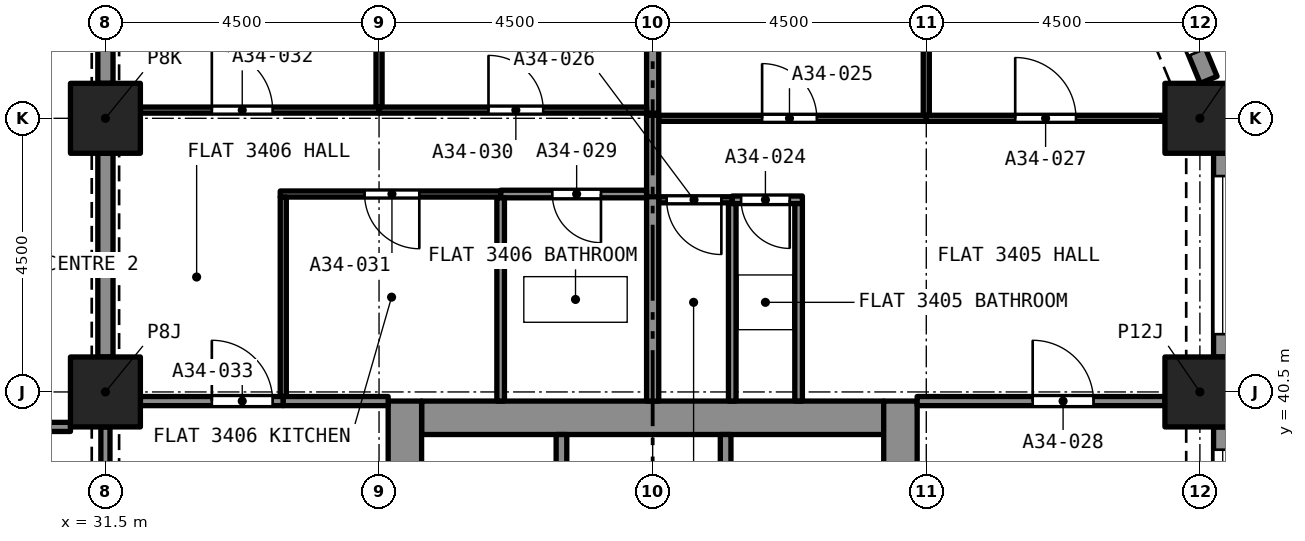
"""IFC4 building model, lengths in metres.
Left out: names, types, materials, properties, quantities, classifications, styles, units other than length and angle.
Written with IfcOpenShell. Run it as: python <this file> out.ifc"""

import sys

from ifc_helpers import new_model, si_unit, direction, frame, frame_2d, origin, origin_2d, place, context, subcontext, project, spatial, rectangle, extrude, element, fill, save


model = new_model("IFC4")
c1 = context("Model", 3, precision=1e-05, world=origin(), true_north=direction((0.0, 1.0)))
c2 = subcontext(c1, "Body", "Model", "MODEL_VIEW")
j1 = project(units=[si_unit("LENGTHUNIT", "METRE"), si_unit("PLANEANGLEUNIT", "RADIAN")], contexts=[c1])
p1 = place(None, origin())
s1 = spatial("IfcSite", under=j1, at=p1, CompositionType="ELEMENT")
p2 = place(p1, origin())
s2 = spatial("IfcBuilding", under=s1, at=p2, CompositionType="ELEMENT")
p3 = place(p2, frame((0.0, 0.0, 121.6)))
s3 = spatial("IfcBuildingStorey", under=s2, at=p3, CompositionType="ELEMENT", Elevation=121.6)
for number, where, z_axis, x_axis in (
    (1, (31.5, 40.5, 0.0), (0.0, 0.0, 1.0), (1.0, 0.0, 0.0)),
    (2, (49.5, 40.5, 0.0), (0.0, 0.0, 1.0), (1.0, 0.0, 0.0)),
    (3, (31.5, 45.0, 0.0), (0.0, 0.0, 1.0), (1.0, 0.0, 0.0)),
    (4, (49.5, 45.0, 0.0), (0.0, 0.0, 1.0), (1.0, 0.0, 0.0)),
):
    element("IfcColumn", number, at=place(p3, frame(where, z_axis=z_axis, x_axis=x_axis)), inside=s3, PredefinedType="COLUMN", context=c2, shape_type="SweptSolid", body=[
        extrude(rectangle(XDim=1.15, YDim=1.15, at=origin_2d()), origin(), (0.0, 0.0, 1.0), 3.2),
    ])
p4 = place(p3, frame((36.7, 40.075, 0.0), z_axis=(0.0, 0.0, 1.0), x_axis=(1.0, 0.0, 0.0)))
e5 = element("IfcWall", 5, at=p4, inside=s3, PredefinedType="SOLIDWALL", context=c2, shape_type="SweptSolid", body=[
    extrude(rectangle(XDim=7.6, YDim=0.55, at=frame_2d((3.8, 0.0))), origin(), (0.0, 0.0, 1.0), 3.2),
])
p5 = place(p3, frame((36.425, 27.15, 0.0), z_axis=(0.0, 0.0, 1.0), x_axis=(0.0, 1.0, 0.0)))
e6 = element("IfcWall", 6, at=p5, inside=s3, PredefinedType="SOLIDWALL", context=c2, shape_type="SweptSolid", body=[
    extrude(rectangle(XDim=13.2, YDim=0.55, at=frame_2d((6.6, 0.0))), origin(), (0.0, 0.0, 1.0), 3.2),
])
p6 = place(p5, frame((8.8, 0.0, 0.0)))
e7 = element("IfcOpeningElement", 7, at=p6, cuts=e6, PredefinedType="OPENING", context=c2, shape_type="SweptSolid", body=[
    extrude(rectangle(XDim=1.2, YDim=2.1, at=frame_2d((0.6, 1.05))), frame((0.0, 0.285, 0.0), z_axis=(0.0, -1.0, 0.0), x_axis=(1.0, 0.0, 0.0)), (0.0, 0.0, 1.0), 0.57),
])
p7 = place(p3, frame((44.575, 27.15, 0.0), z_axis=(0.0, 0.0, 1.0), x_axis=(0.0, 1.0, 0.0)))
e8 = element("IfcWall", 8, at=p7, inside=s3, PredefinedType="SOLIDWALL", context=c2, shape_type="SweptSolid", body=[
    extrude(rectangle(XDim=13.2, YDim=0.55, at=frame_2d((6.6, 0.0))), origin(), (0.0, 0.0, 1.0), 3.2),
])
p8 = place(p7, frame((8.8, 0.0, 0.0)))
e9 = element("IfcOpeningElement", 9, at=p8, cuts=e8, PredefinedType="OPENING", context=c2, shape_type="SweptSolid", body=[
    extrude(rectangle(XDim=1.2, YDim=2.1, at=frame_2d((0.6, 1.05))), frame((0.0, 0.285, 0.0), z_axis=(0.0, -1.0, 0.0), x_axis=(1.0, 0.0, 0.0)), (0.0, 0.0, 1.0), 0.57),
])
p9 = place(p3, frame((49.875, 39.925, 0.0), z_axis=(0.0, 0.0, 1.0), x_axis=(0.0, -1.0, 0.0)))
e10 = element("IfcWall", 10, at=p9, inside=s3, PredefinedType="SOLIDWALL", context=c2, shape_type="SweptSolid", body=[
    extrude(rectangle(XDim=3.35, YDim=0.3, at=frame_2d((1.675, 0.0))), origin(), (0.0, 0.0, 1.0), 3.2),
])
p10 = place(p9, frame((0.375, 0.0, 0.45)))
e11 = element("IfcOpeningElement", 11, at=p10, cuts=e10, PredefinedType="OPENING", context=c2, shape_type="SweptSolid", body=[
    extrude(rectangle(XDim=2.6, YDim=1.95, at=frame_2d((1.3, 0.975))), frame((0.0, 0.16, 0.0), z_axis=(0.0, -1.0, 0.0), x_axis=(1.0, 0.0, 0.0)), (0.0, 0.0, 1.0), 0.32),
])
p11 = place(p3, frame((49.875, 44.425, 0.0), z_axis=(0.0, 0.0, 1.0), x_axis=(0.0, -1.0, 0.0)))
e12 = element("IfcWall", 12, at=p11, inside=s3, PredefinedType="SOLIDWALL", context=c2, shape_type="SweptSolid", body=[
    extrude(rectangle(XDim=3.35, YDim=0.3, at=frame_2d((1.675, 0.0))), origin(), (0.0, 0.0, 1.0), 3.2),
])
p12 = place(p11, frame((0.375, 0.0, 0.45)))
e13 = element("IfcOpeningElement", 13, at=p12, cuts=e12, PredefinedType="OPENING", context=c2, shape_type="SweptSolid", body=[
    extrude(rectangle(XDim=2.6, YDim=1.95, at=frame_2d((1.3, 0.975))), frame((0.0, 0.16, 0.0), z_axis=(0.0, -1.0, 0.0), x_axis=(1.0, 0.0, 0.0)), (0.0, 0.0, 1.0), 0.32),
])
p13 = place(p3, frame((48.816, 47.631, 0.0), z_axis=(0.0, 0.0, 1.0), x_axis=(0.382723818695, -0.923862802911, 0.0)))
e14 = element("IfcWall", 14, at=p13, inside=s3, PredefinedType="SOLIDWALL", context=c2, shape_type="SweptSolid", body=[
    extrude(rectangle(XDim=2.164, YDim=0.3, at=frame_2d((1.082, 0.0))), origin(), (0.0, 0.0, 1.0), 3.2),
])
p14 = place(p13, frame((0.271, 0.0, 0.45)))
e15 = element("IfcOpeningElement", 15, at=p14, cuts=e14, PredefinedType="OPENING", context=c2, shape_type="SweptSolid", body=[
    extrude(rectangle(XDim=1.4, YDim=1.95, at=frame_2d((0.7, 0.975))), frame((0.0, 0.16, 0.0), z_axis=(0.0, -1.0, 0.0), x_axis=(1.0, 0.0, 0.0)), (0.0, 0.0, 1.0), 0.32),
])
p15 = place(p3, frame((42.962, 43.66, 0.0), z_axis=(0.0, 0.0, 1.0), x_axis=(-1.0, 0.0, 0.0)))
e16 = element("IfcWall", 16, at=p15, inside=s3, PredefinedType="PARTITIONING", context=c2, shape_type="SweptSolid", body=[
    extrude(rectangle(XDim=1.153, YDim=0.125, at=frame_2d((0.577, 0.0))), origin(), (0.0, 0.0, 1.0), 2.85),
])
p16 = place(p15, frame((0.208, 0.0, 0.0)))
e17 = element("IfcOpeningElement", 17, at=p16, cuts=e16, PredefinedType="OPENING", context=c2, shape_type="SweptSolid", body=[
    extrude(rectangle(XDim=0.8, YDim=2.1, at=frame_2d((0.4, 1.05))), frame((0.0, 0.073, 0.0), z_axis=(0.0, -1.0, 0.0), x_axis=(1.0, 0.0, 0.0)), (0.0, 0.0, 1.0), 0.145),
])
for number, where, z_axis, x_axis in (
    (18, (42.9, 40.35, 0.0), (0.0, 0.0, 1.0), (0.0, 1.0, 0.0)),
    (19, (41.809, 40.35, 0.0), (0.0, 0.0, 1.0), (0.0, 1.0, 0.0)),
):
    element("IfcWall", number, at=place(p3, frame(where, z_axis=z_axis, x_axis=x_axis)), inside=s3, PredefinedType="PARTITIONING", context=c2, shape_type="SweptSolid", body=[
        extrude(rectangle(XDim=3.247, YDim=0.125, at=frame_2d((1.624, 0.0))), origin(), (0.0, 0.0, 1.0), 2.85),
    ])
p17 = place(p3, frame((40.6, 45.0, 0.0), z_axis=(0.0, 0.0, 1.0), x_axis=(1.0, 0.0, 0.0)))
e20 = element("IfcWall", 20, at=p17, inside=s3, PredefinedType="PARTITIONING", context=c2, shape_type="SweptSolid", body=[
    extrude(rectangle(XDim=4.4, YDim=0.1, at=frame_2d((2.2, 0.0))), origin(), (0.0, 0.0, 1.0), 2.85),
])
p18 = place(p17, frame((1.7, 0.0, 0.0)))
e21 = element("IfcOpeningElement", 21, at=p18, cuts=e20, PredefinedType="OPENING", context=c2, shape_type="SweptSolid", body=[
    extrude(rectangle(XDim=0.9, YDim=2.1, at=frame_2d((0.45, 1.05))), frame((0.0, 0.06, 0.0), z_axis=(0.0, -1.0, 0.0), x_axis=(1.0, 0.0, 0.0)), (0.0, 0.0, 1.0), 0.12),
])
p19 = place(p3, frame((45.0, 45.05, 0.0), z_axis=(0.0, 0.0, 1.0), x_axis=(0.0, 1.0, 0.0)))
e22 = element("IfcWall", 22, at=p19, inside=s3, PredefinedType="PARTITIONING", context=c2, shape_type="SweptSolid", body=[
    extrude(rectangle(XDim=3.828, YDim=0.1, at=frame_2d((1.914, 0.0))), origin(), (0.0, 0.0, 1.0), 2.85),
])
p20 = place(p3, frame((40.5, 45.085, 0.0), z_axis=(0.0, 0.0, 1.0), x_axis=(0.0, 1.0, 0.0)))
e23 = element("IfcWall", 23, at=p20, inside=s3, PredefinedType="PARTITIONING", context=c2, shape_type="SweptSolid", body=[
    extrude(rectangle(XDim=3.84, YDim=0.2, at=frame_2d((1.92, 0.0))), origin(), (0.0, 0.0, 1.0), 2.85),
])
p21 = place(p3, frame((41.809, 43.66, 0.0), z_axis=(0.0, 0.0, 1.0), x_axis=(-1.0, 0.0, 0.0)))
e24 = element("IfcWall", 24, at=p21, inside=s3, PredefinedType="PARTITIONING", context=c2, shape_type="SweptSolid", body=[
    extrude(rectangle(XDim=1.209, YDim=0.1, at=frame_2d((0.604, 0.0))), origin(), (0.0, 0.0, 1.0), 2.85),
])
p22 = place(p21, frame((0.179, 0.0, 0.0)))
e25 = element("IfcOpeningElement", 25, at=p22, cuts=e24, PredefinedType="OPENING", context=c2, shape_type="SweptSolid", body=[
    extrude(rectangle(XDim=0.9, YDim=2.1, at=frame_2d((0.45, 1.05))), frame((0.0, 0.06, 0.0), z_axis=(0.0, -1.0, 0.0), x_axis=(1.0, 0.0, 0.0)), (0.0, 0.0, 1.0), 0.12),
])
p23 = place(p3, frame((45.0, 45.0, 0.0), z_axis=(0.0, 0.0, 1.0), x_axis=(1.0, 0.0, 0.0)))
e26 = element("IfcWall", 26, at=p23, inside=s3, PredefinedType="PARTITIONING", context=c2, shape_type="SweptSolid", body=[
    extrude(rectangle(XDim=3.878, YDim=0.1, at=frame_2d((1.939, 0.0))), origin(), (0.0, 0.0, 1.0), 2.85),
])
p24 = place(p23, frame((1.462, 0.0, 0.0)))
e27 = element("IfcOpeningElement", 27, at=p24, cuts=e26, PredefinedType="OPENING", context=c2, shape_type="SweptSolid", body=[
    extrude(rectangle(XDim=1.0, YDim=2.1, at=frame_2d((0.5, 1.05))), frame((0.0, 0.06, 0.0), z_axis=(0.0, -1.0, 0.0), x_axis=(1.0, 0.0, 0.0)), (0.0, 0.0, 1.0), 0.12),
])
p25 = place(p3, frame((40.5, 43.692, 0.0), z_axis=(0.0, 0.0, 1.0), x_axis=(0.0, 1.0, 0.0)))
e28 = element("IfcWall", 28, at=p25, inside=s3, PredefinedType="PARTITIONING", context=c2, shape_type="SweptSolid", body=[
    extrude(rectangle(XDim=1.358, YDim=0.2, at=frame_2d((0.679, 0.0))), origin(), (0.0, 0.0, 1.0), 2.85),
])
p26 = place(p3, frame((44.85, 40.35, 0.0), z_axis=(0.0, 0.0, 1.0), x_axis=(1.0, 0.0, 0.0)))
e29 = element("IfcWall", 29, at=p26, inside=s3, PredefinedType="PARTITIONING", context=c2, shape_type="SweptSolid", body=[
    extrude(rectangle(XDim=4.075, YDim=0.15, at=frame_2d((2.038, 0.0))), origin(), (0.0, 0.0, 1.0), 2.85),
])
p27 = place(p26, frame((1.9, 0.0, 0.0)))
e30 = element("IfcOpeningElement", 30, at=p27, cuts=e29, PredefinedType="OPENING", context=c2, shape_type="SweptSolid", body=[
    extrude(rectangle(XDim=1.0, YDim=2.1, at=frame_2d((0.5, 1.05))), frame((0.0, 0.085, 0.0), z_axis=(0.0, -1.0, 0.0), x_axis=(1.0, 0.0, 0.0)), (0.0, 0.0, 1.0), 0.17),
])
p28 = place(p3, frame((40.5, 40.35, 0.0), z_axis=(0.0, 0.0, 1.0), x_axis=(0.0, 1.0, 0.0)))
e31 = element("IfcWall", 31, at=p28, inside=s3, PredefinedType="PARTITIONING", context=c2, shape_type="SweptSolid", body=[
    extrude(rectangle(XDim=3.36, YDim=0.2, at=frame_2d((1.68, 0.0))), origin(), (0.0, 0.0, 1.0), 2.85),
])
p29 = place(p3, frame((40.4, 43.755, 0.0), z_axis=(0.0, 0.0, 1.0), x_axis=(-1.0, 0.0, 0.0)))
e32 = element("IfcWall", 32, at=p29, inside=s3, PredefinedType="PARTITIONING", context=c2, shape_type="SweptSolid", body=[
    extrude(rectangle(XDim=2.4, YDim=0.125, at=frame_2d((1.2, 0.0))), origin(), (0.0, 0.0, 1.0), 2.85),
])
p30 = place(p29, frame((0.75, 0.0, 0.0)))
e33 = element("IfcOpeningElement", 33, at=p30, cuts=e32, PredefinedType="OPENING", context=c2, shape_type="SweptSolid", body=[
    extrude(rectangle(XDim=0.8, YDim=2.1, at=frame_2d((0.4, 1.05))), frame((0.0, 0.073, 0.0), z_axis=(0.0, -1.0, 0.0), x_axis=(1.0, 0.0, 0.0)), (0.0, 0.0, 1.0), 0.145),
])
p31 = place(p3, frame((38.0, 40.35, 0.0), z_axis=(0.0, 0.0, 1.0), x_axis=(0.0, 1.0, 0.0)))
e34 = element("IfcWall", 34, at=p31, inside=s3, PredefinedType="PARTITIONING", context=c2, shape_type="SweptSolid", body=[
    extrude(rectangle(XDim=3.342, YDim=0.125, at=frame_2d((1.671, 0.0))), origin(), (0.0, 0.0, 1.0), 2.85),
])
p32 = place(p3, frame((36.0, 45.135, 0.0), z_axis=(0.0, 0.0, 1.0), x_axis=(1.0, 0.0, 0.0)))
e35 = element("IfcWall", 35, at=p32, inside=s3, PredefinedType="PARTITIONING", context=c2, shape_type="SweptSolid", body=[
    extrude(rectangle(XDim=4.4, YDim=0.1, at=frame_2d((2.2, 0.0))), origin(), (0.0, 0.0, 1.0), 2.85),
])
p33 = place(p32, frame((1.8, 0.0, 0.0)))
e36 = element("IfcOpeningElement", 36, at=p33, cuts=e35, PredefinedType="OPENING", context=c2, shape_type="SweptSolid", body=[
    extrude(rectangle(XDim=0.9, YDim=2.1, at=frame_2d((0.45, 1.05))), frame((0.0, 0.06, 0.0), z_axis=(0.0, -1.0, 0.0), x_axis=(1.0, 0.0, 0.0)), (0.0, 0.0, 1.0), 0.12),
])
p34 = place(p3, frame((36.0, 45.185, 0.0), z_axis=(0.0, 0.0, 1.0), x_axis=(0.0, 1.0, 0.0)))
e37 = element("IfcWall", 37, at=p34, inside=s3, PredefinedType="PARTITIONING", context=c2, shape_type="SweptSolid", body=[
    extrude(rectangle(XDim=3.74, YDim=0.1, at=frame_2d((1.87, 0.0))), origin(), (0.0, 0.0, 1.0), 2.85),
])
p35 = place(p3, frame((38.0, 43.755, 0.0), z_axis=(0.0, 0.0, 1.0), x_axis=(-1.0, 0.0, 0.0)))
e38 = element("IfcWall", 38, at=p35, inside=s3, PredefinedType="PARTITIONING", context=c2, shape_type="SweptSolid", body=[
    extrude(rectangle(XDim=3.625, YDim=0.1, at=frame_2d((1.812, 0.0))), origin(), (0.0, 0.0, 1.0), 2.85),
])
p36 = place(p35, frame((1.337, 0.0, 0.0)))
e39 = element("IfcOpeningElement", 39, at=p36, cuts=e38, PredefinedType="OPENING", context=c2, shape_type="SweptSolid", body=[
    extrude(rectangle(XDim=0.9, YDim=2.1, at=frame_2d((0.45, 1.05))), frame((0.0, 0.06, 0.0), z_axis=(0.0, -1.0, 0.0), x_axis=(1.0, 0.0, 0.0)), (0.0, 0.0, 1.0), 0.12),
])
p37 = place(p3, frame((34.425, 40.425, 0.0), z_axis=(0.0, 0.0, 1.0), x_axis=(0.0, 1.0, 0.0)))
e40 = element("IfcWall", 40, at=p37, inside=s3, PredefinedType="PARTITIONING", context=c2, shape_type="SweptSolid", body=[
    extrude(rectangle(XDim=3.28, YDim=0.1, at=frame_2d((1.64, 0.0))), origin(), (0.0, 0.0, 1.0), 2.85),
])
p38 = place(p3, frame((32.075, 45.135, 0.0), z_axis=(0.0, 0.0, 1.0), x_axis=(1.0, 0.0, 0.0)))
e41 = element("IfcWall", 41, at=p38, inside=s3, PredefinedType="PARTITIONING", context=c2, shape_type="SweptSolid", body=[
    extrude(rectangle(XDim=3.925, YDim=0.1, at=frame_2d((1.962, 0.0))), origin(), (0.0, 0.0, 1.0), 2.85),
])
p39 = place(p38, frame((1.175, 0.0, 0.0)))
e42 = element("IfcOpeningElement", 42, at=p39, cuts=e41, PredefinedType="OPENING", context=c2, shape_type="SweptSolid", body=[
    extrude(rectangle(XDim=1.0, YDim=2.1, at=frame_2d((0.5, 1.05))), frame((0.0, 0.06, 0.0), z_axis=(0.0, -1.0, 0.0), x_axis=(1.0, 0.0, 0.0)), (0.0, 0.0, 1.0), 0.12),
])
p40 = place(p3, frame((31.5, 41.075, 0.0), z_axis=(0.0, 0.0, 1.0), x_axis=(0.0, 1.0, 0.0)))
e43 = element("IfcWall", 43, at=p40, inside=s3, PredefinedType="PARTITIONING", context=c2, shape_type="SweptSolid", body=[
    extrude(rectangle(XDim=3.35, YDim=0.25, at=frame_2d((1.675, 0.0))), origin(), (0.0, 0.0, 1.0), 2.38),
])
p41 = place(p3, frame((32.075, 40.35, 0.0), z_axis=(0.0, 0.0, 1.0), x_axis=(1.0, 0.0, 0.0)))
e44 = element("IfcWall", 44, at=p41, inside=s3, PredefinedType="PARTITIONING", context=c2, shape_type="SweptSolid", body=[
    extrude(rectangle(XDim=2.35, YDim=0.15, at=frame_2d((1.175, 0.0))), origin(), (0.0, 0.0, 1.0), 2.85),
])
p42 = place(p41, frame((1.175, 0.0, 0.0)))
e45 = element("IfcOpeningElement", 45, at=p42, cuts=e44, PredefinedType="OPENING", context=c2, shape_type="SweptSolid", body=[
    extrude(rectangle(XDim=1.0, YDim=2.1, at=frame_2d((0.5, 1.05))), frame((0.0, 0.085, 0.0), z_axis=(0.0, -1.0, 0.0), x_axis=(1.0, 0.0, 0.0)), (0.0, 0.0, 1.0), 0.17),
])
p43 = place(p3, frame((34.425, 40.35, 0.0), z_axis=(0.0, 0.0, 1.0), x_axis=(1.0, 0.0, 0.0)))
e46 = element("IfcWall", 46, at=p43, inside=s3, PredefinedType="PARTITIONING", context=c2, shape_type="SweptSolid", body=[
    extrude(rectangle(XDim=1.725, YDim=0.15, at=frame_2d((0.862, 0.0))), origin(), (0.0, 0.0, 1.0), 2.85),
])
p44 = place(p3, frame((31.5, 45.575, 0.0), z_axis=(0.0, 0.0, 1.0), x_axis=(0.0, 1.0, 0.0)))
e47 = element("IfcWall", 47, at=p44, inside=s3, PredefinedType="PARTITIONING", context=c2, shape_type="SweptSolid", body=[
    extrude(rectangle(XDim=3.35, YDim=0.25, at=frame_2d((1.675, 0.0))), origin(), (0.0, 0.0, 1.0), 2.38),
])
p45 = place(p3, frame((27.0, 39.925, 0.0), z_axis=(0.0, 0.0, 1.0), x_axis=(1.0, 0.0, 0.0)))
e48 = element("IfcWall", 48, at=p45, inside=s3, PredefinedType="PARTITIONING", context=c2, shape_type="SweptSolid", body=[
    extrude(rectangle(XDim=3.925, YDim=0.15, at=frame_2d((1.962, 0.0))), origin(), (0.0, 0.0, 1.0), 2.75),
])
p46 = place(p45, frame((1.75, 0.0, 0.0)))
e49 = element("IfcOpeningElement", 49, at=p46, cuts=e48, PredefinedType="OPENING", context=c2, shape_type="SweptSolid", body=[
    extrude(rectangle(XDim=1.0, YDim=2.1, at=frame_2d((0.5, 1.05))), frame((0.0, 0.085, 0.0), z_axis=(0.0, -1.0, 0.0), x_axis=(1.0, 0.0, 0.0)), (0.0, 0.0, 1.0), 0.17),
])
p47 = place(p3, frame((31.5, 36.575, 0.0), z_axis=(0.0, 0.0, 1.0), x_axis=(0.0, 1.0, 0.0)))
e50 = element("IfcWall", 50, at=p47, inside=s3, PredefinedType="PARTITIONING", context=c2, shape_type="SweptSolid", body=[
    extrude(rectangle(XDim=3.35, YDim=0.15, at=frame_2d((1.675, 0.0))), origin(), (0.0, 0.0, 1.0), 2.38),
])
p48 = place(p47, frame((1.075, 0.0, 0.0)))
e51 = element("IfcOpeningElement", 51, at=p48, cuts=e50, PredefinedType="OPENING", context=c2, shape_type="SweptSolid", body=[
    extrude(rectangle(XDim=1.2, YDim=2.1, at=frame_2d((0.6, 1.05))), frame((0.0, 0.085, 0.0), z_axis=(0.0, -1.0, 0.0), x_axis=(1.0, 0.0, 0.0)), (0.0, 0.0, 1.0), 0.17),
])
for number, where, z_axis, x_axis in (
    (52, (41.7, 37.5, 0.0), (0.0, 0.0, 1.0), (0.0, 1.0, 0.0)),
    (53, (39.0, 37.5, 0.0), (0.0, 0.0, 1.0), (0.0, 1.0, 0.0)),
):
    element("IfcWall", number, at=place(p3, frame(where, z_axis=z_axis, x_axis=x_axis)), inside=s3, PredefinedType="SOLIDWALL", context=c2, shape_type="SweptSolid", body=[
        extrude(rectangle(XDim=2.3, YDim=0.175, at=frame_2d((1.15, 0.0))), origin(), (0.0, 0.0, 1.0), 2.85),
    ])
p49 = place(p10, origin())
e54 = element("IfcWindow", 54, at=p49, inside=s3, PartitioningType="SINGLE_PANEL", PredefinedType="WINDOW", context=c2, shape_type="SweptSolid", body=[
    extrude(rectangle(XDim=2.6, YDim=1.95, at=frame_2d((1.3, 0.975))), frame((0.0, 0.03, 0.0), z_axis=(0.0, -1.0, 0.0), x_axis=(1.0, 0.0, 0.0)), (0.0, 0.0, 1.0), 0.06),
])
fill(e11, e54)
p50 = place(p12, origin())
e55 = element("IfcWindow", 55, at=p50, inside=s3, PartitioningType="SINGLE_PANEL", PredefinedType="WINDOW", context=c2, shape_type="SweptSolid", body=[
    extrude(rectangle(XDim=2.6, YDim=1.95, at=frame_2d((1.3, 0.975))), frame((0.0, 0.03, 0.0), z_axis=(0.0, -1.0, 0.0), x_axis=(1.0, 0.0, 0.0)), (0.0, 0.0, 1.0), 0.06),
])
fill(e13, e55)
p51 = place(p14, origin())
e56 = element("IfcWindow", 56, at=p51, inside=s3, PartitioningType="SINGLE_PANEL", PredefinedType="WINDOW", context=c2, shape_type="SweptSolid", body=[
    extrude(rectangle(XDim=1.4, YDim=1.95, at=frame_2d((0.7, 0.975))), frame((0.0, 0.03, 0.0), z_axis=(0.0, -1.0, 0.0), x_axis=(1.0, 0.0, 0.0)), (0.0, 0.0, 1.0), 0.06),
])
fill(e15, e56)
p52 = place(p16, origin())
e57 = element("IfcDoor", 57, at=p52, inside=s3, OperationType="SINGLE_SWING_RIGHT", PredefinedType="DOOR", context=c2, shape_type="SweptSolid", body=[
    extrude(rectangle(XDim=0.8, YDim=2.1, at=frame_2d((0.4, 1.05))), frame((0.0, 0.025, 0.0), z_axis=(0.0, -1.0, 0.0), x_axis=(1.0, 0.0, 0.0)), (0.0, 0.0, 1.0), 0.05),
])
fill(e17, e57)
p53 = place(p18, origin())
e58 = element("IfcDoor", 58, at=p53, inside=s3, OperationType="SINGLE_SWING_LEFT", PredefinedType="DOOR", context=c2, shape_type="SweptSolid", body=[
    extrude(rectangle(XDim=0.9, YDim=2.1, at=frame_2d((0.45, 1.05))), frame((0.0, 0.025, 0.0), z_axis=(0.0, -1.0, 0.0), x_axis=(1.0, 0.0, 0.0)), (0.0, 0.0, 1.0), 0.05),
])
fill(e21, e58)
p54 = place(p22, origin())
e59 = element("IfcDoor", 59, at=p54, inside=s3, OperationType="SINGLE_SWING_RIGHT", PredefinedType="DOOR", context=c2, shape_type="SweptSolid", body=[
    extrude(rectangle(XDim=0.9, YDim=2.1, at=frame_2d((0.45, 1.05))), frame((0.0, 0.025, 0.0), z_axis=(0.0, -1.0, 0.0), x_axis=(1.0, 0.0, 0.0)), (0.0, 0.0, 1.0), 0.05),
])
fill(e25, e59)
p55 = place(p24, origin())
e60 = element("IfcDoor", 60, at=p55, inside=s3, OperationType="SINGLE_SWING_RIGHT", PredefinedType="DOOR", context=c2, shape_type="SweptSolid", body=[
    extrude(rectangle(XDim=1.0, YDim=2.1, at=frame_2d((0.5, 1.05))), frame((0.0, 0.025, 0.0), z_axis=(0.0, -1.0, 0.0), x_axis=(1.0, 0.0, 0.0)), (0.0, 0.0, 1.0), 0.05),
])
fill(e27, e60)
p56 = place(p27, origin())
e61 = element("IfcDoor", 61, at=p56, inside=s3, OperationType="SINGLE_SWING_RIGHT", PredefinedType="DOOR", context=c2, shape_type="SweptSolid", body=[
    extrude(rectangle(XDim=1.0, YDim=2.1, at=frame_2d((0.5, 1.05))), frame((0.0, 0.025, 0.0), z_axis=(0.0, -1.0, 0.0), x_axis=(1.0, 0.0, 0.0)), (0.0, 0.0, 1.0), 0.05),
])
fill(e30, e61)
p57 = place(p30, origin())
e62 = element("IfcDoor", 62, at=p57, inside=s3, OperationType="SINGLE_SWING_LEFT", PredefinedType="DOOR", context=c2, shape_type="SweptSolid", body=[
    extrude(rectangle(XDim=0.8, YDim=2.1, at=frame_2d((0.4, 1.05))), frame((0.0, 0.025, 0.0), z_axis=(0.0, -1.0, 0.0), x_axis=(1.0, 0.0, 0.0)), (0.0, 0.0, 1.0), 0.05),
])
fill(e33, e62)
p58 = place(p33, origin())
e63 = element("IfcDoor", 63, at=p58, inside=s3, OperationType="SINGLE_SWING_RIGHT", PredefinedType="DOOR", context=c2, shape_type="SweptSolid", body=[
    extrude(rectangle(XDim=0.9, YDim=2.1, at=frame_2d((0.45, 1.05))), frame((0.0, 0.025, 0.0), z_axis=(0.0, -1.0, 0.0), x_axis=(1.0, 0.0, 0.0)), (0.0, 0.0, 1.0), 0.05),
])
fill(e36, e63)
p59 = place(p36, origin())
e64 = element("IfcDoor", 64, at=p59, inside=s3, OperationType="SINGLE_SWING_LEFT", PredefinedType="DOOR", context=c2, shape_type="SweptSolid", body=[
    extrude(rectangle(XDim=0.9, YDim=2.1, at=frame_2d((0.45, 1.05))), frame((0.0, 0.025, 0.0), z_axis=(0.0, -1.0, 0.0), x_axis=(1.0, 0.0, 0.0)), (0.0, 0.0, 1.0), 0.05),
])
fill(e39, e64)
p60 = place(p39, origin())
e65 = element("IfcDoor", 65, at=p60, inside=s3, OperationType="SINGLE_SWING_LEFT", PredefinedType="DOOR", context=c2, shape_type="SweptSolid", body=[
    extrude(rectangle(XDim=1.0, YDim=2.1, at=frame_2d((0.5, 1.05))), frame((0.0, 0.025, 0.0), z_axis=(0.0, -1.0, 0.0), x_axis=(1.0, 0.0, 0.0)), (0.0, 0.0, 1.0), 0.05),
])
fill(e42, e65)
p61 = place(p42, origin())
e66 = element("IfcDoor", 66, at=p61, inside=s3, OperationType="SINGLE_SWING_RIGHT", PredefinedType="DOOR", context=c2, shape_type="SweptSolid", body=[
    extrude(rectangle(XDim=1.0, YDim=2.1, at=frame_2d((0.5, 1.05))), frame((0.0, 0.025, 0.0), z_axis=(0.0, -1.0, 0.0), x_axis=(1.0, 0.0, 0.0)), (0.0, 0.0, 1.0), 0.05),
])
fill(e45, e66)
save(model, sys.argv[1])
